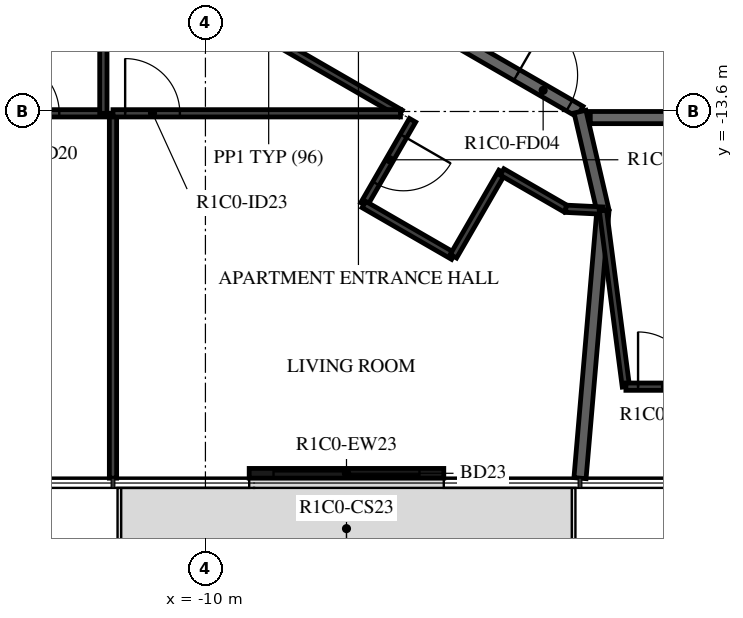
"""IFC4 building model, lengths in metres.
Left out: names, types, materials, properties, quantities, classifications, styles, units other than length and angle.
Written with IfcOpenShell. Run it as: python <this file> out.ifc"""

import sys

from ifc_helpers import new_model, si_unit, direction, frame, frame_2d, origin, place, context, subcontext, project, spatial, rectangle, extrude, element, fill, save


model = new_model("IFC4")
c1 = context("Model", 3, precision=1e-05, world=origin(), true_north=direction((0.0, 1.0)))
c2 = subcontext(c1, "Body", "Model", "MODEL_VIEW")
j1 = project(units=[si_unit("LENGTHUNIT", "METRE"), si_unit("PLANEANGLEUNIT", "RADIAN")], contexts=[c1])
p1 = place(None, origin())
s1 = spatial("IfcSite", under=j1, at=p1, CompositionType="ELEMENT")
p2 = place(p1, origin())
s2 = spatial("IfcBuilding", under=s1, at=p2, CompositionType="ELEMENT")
p3 = place(p2, frame((0.0, 0.0, 66.4)))
s3 = spatial("IfcBuildingStorey", under=s2, at=p3, CompositionType="ELEMENT", Elevation=66.4)
p4 = place(p3, frame((-9.28, -19.55, 0.0), z_axis=(0.0, 0.0, 1.0), x_axis=(1.0, 0.0, 0.0)))
e1 = element("IfcWall", 1, at=p4, inside=s3, PredefinedType="STANDARD", context=c2, shape_type="SweptSolid", body=[
    extrude(rectangle(XDim=3.2, YDim=0.16, at=frame_2d((1.6, 0.0))), origin(), (0.0, 0.0, 1.0), 3.05),
])
p5 = place(p4, frame((0.4, 0.0, 0.0)))
e2 = element("IfcOpeningElement", 2, at=p5, cuts=e1, PredefinedType="OPENING", context=c2, shape_type="SweptSolid", body=[
    extrude(rectangle(XDim=2.4, YDim=2.4, at=frame_2d((1.2, 1.2))), frame((0.0, 0.09, 0.0), z_axis=(0.0, -1.0, 0.0), x_axis=(1.0, 0.0, 0.0)), (0.0, 0.0, 1.0), 0.18),
])
p6 = place(p3, frame((-10.029, -10.029, 0.0), z_axis=(0.0, 0.0, 1.0), x_axis=(0.866022878987, -0.500004373052, 0.0)))
e3 = element("IfcWall", 3, at=p6, inside=s3, PredefinedType="STANDARD", context=c2, shape_type="SweptSolid", body=[
    extrude(rectangle(XDim=7.146, YDim=0.2, at=frame_2d((3.573, 0.0))), origin(), (0.0, 0.0, 1.0), 3.05),
])
p7 = place(p6, frame((5.947, 0.0, 0.0)))
e4 = element("IfcOpeningElement", 4, at=p7, cuts=e3, PredefinedType="OPENING", context=c2, shape_type="SweptSolid", body=[
    extrude(rectangle(XDim=1.0, YDim=2.1, at=frame_2d((0.5, 1.05))), frame((0.0, 0.11, 0.0), z_axis=(0.0, -1.0, 0.0), x_axis=(1.0, 0.0, 0.0)), (0.0, 0.0, 1.0), 0.22),
])
p8 = place(p3, frame((-3.671, -13.7, 0.0), z_axis=(0.0, 0.0, 1.0), x_axis=(1.0, 0.0, 0.0)))
e5 = element("IfcWall", 5, at=p8, inside=s3, PredefinedType="STANDARD", context=c2, shape_type="SweptSolid", body=[
    extrude(rectangle(XDim=7.342, YDim=0.2, at=frame_2d((3.671, 0.0))), origin(), (0.0, 0.0, 1.0), 3.05),
])
p9 = place(p8, frame((2.1, 0.0, 0.0)))
e6 = element("IfcOpeningElement", 6, at=p9, cuts=e5, PredefinedType="OPENING", context=c2, shape_type="SweptSolid", body=[
    extrude(rectangle(XDim=1.0, YDim=2.1, at=frame_2d((0.5, 1.05))), frame((0.0, 0.11, 0.0), z_axis=(0.0, -1.0, 0.0), x_axis=(1.0, 0.0, 0.0)), (0.0, 0.0, 1.0), 0.22),
])
p10 = place(p3, frame((-3.463, -15.23, 0.0), z_axis=(0.0, 0.0, 1.0), x_axis=(-0.225894501138, 0.974151771725, 0.0)))
e7 = element("IfcWall", 7, at=p10, inside=s3, PredefinedType="STANDARD", context=c2, shape_type="SweptSolid", body=[
    extrude(rectangle(XDim=1.671, YDim=0.2, at=frame_2d((0.835, 0.0))), origin(), (0.0, 0.0, 1.0), 3.05),
])
p11 = place(p3, frame((-3.84, -19.63, 0.0), z_axis=(0.0, 0.0, 1.0), x_axis=(0.085470135005, 0.996340732893, 0.0)))
e8 = element("IfcWall", 8, at=p11, inside=s3, PredefinedType="STANDARD", context=c2, shape_type="SweptSolid", body=[
    extrude(rectangle(XDim=4.416, YDim=0.2, at=frame_2d((2.208, 0.0))), origin(), (0.0, 0.0, 1.0), 3.05),
])
p12 = place(p3, frame((-11.127, -11.127, 0.0), z_axis=(0.0, 0.0, 1.0), x_axis=(0.866034514313, -0.499984219769, 0.0)))
e9 = element("IfcWall", 9, at=p12, inside=s3, PredefinedType="PARTITIONING", context=c2, shape_type="SweptSolid", body=[
    extrude(rectangle(XDim=5.006, YDim=0.12, at=frame_2d((2.503, 0.0))), origin(), (0.0, 0.0, 1.0), 3.05),
])
p13 = place(p12, frame((0.2, 0.0, 0.0)))
e10 = element("IfcOpeningElement", 10, at=p13, cuts=e9, PredefinedType="OPENING", context=c2, shape_type="SweptSolid", body=[
    extrude(rectangle(XDim=0.9, YDim=2.1, at=frame_2d((0.45, 1.05))), frame((0.0, 0.07, 0.0), z_axis=(0.0, -1.0, 0.0), x_axis=(1.0, 0.0, 0.0)), (0.0, 0.0, 1.0), 0.14),
])
p14 = place(p3, frame((-6.594, -13.744, 0.0), z_axis=(0.0, 0.0, 1.0), x_axis=(-0.499947031044, -0.866055983265, 0.0)))
e11 = element("IfcWall", 11, at=p14, inside=s3, PredefinedType="PARTITIONING", context=c2, shape_type="SweptSolid", body=[
    extrude(rectangle(XDim=1.6, YDim=0.12, at=frame_2d((0.8, 0.0))), origin(), (0.0, 0.0, 1.0), 3.05),
])
p15 = place(p14, frame((0.3, 0.0, 0.0)))
e12 = element("IfcOpeningElement", 12, at=p15, cuts=e11, PredefinedType="OPENING", context=c2, shape_type="SweptSolid", body=[
    extrude(rectangle(XDim=0.9, YDim=2.1, at=frame_2d((0.45, 1.05))), frame((0.0, 0.07, 0.0), z_axis=(0.0, -1.0, 0.0), x_axis=(1.0, 0.0, 0.0)), (0.0, 0.0, 1.0), 0.14),
])
p16 = place(p3, frame((-7.394, -15.13, 0.0), z_axis=(0.0, 0.0, 1.0), x_axis=(0.86605165483, -0.499954529098, 0.0)))
e13 = element("IfcWall", 13, at=p16, inside=s3, PredefinedType="PARTITIONING", context=c2, shape_type="SweptSolid", body=[
    extrude(rectangle(XDim=1.7, YDim=0.12, at=frame_2d((0.85, 0.0))), origin(), (0.0, 0.0, 1.0), 3.05),
])
p17 = place(p3, frame((-5.922, -15.98, 0.0), z_axis=(0.0, 0.0, 1.0), x_axis=(0.500013115284, 0.866017831539, 0.0)))
e14 = element("IfcWall", 14, at=p17, inside=s3, PredefinedType="PARTITIONING", context=c2, shape_type="SweptSolid", body=[
    extrude(rectangle(XDim=1.6, YDim=0.12, at=frame_2d((0.8, 0.0))), origin(), (0.0, 0.0, 1.0), 3.05),
])
p18 = place(p3, frame((-5.122, -14.594, 0.0), z_axis=(0.0, 0.0, 1.0), x_axis=(0.86610168388, -0.499867855718, 0.0)))
e15 = element("IfcWall", 15, at=p18, inside=s3, PredefinedType="PARTITIONING", context=c2, shape_type="SweptSolid", body=[
    extrude(rectangle(XDim=1.211, YDim=0.12, at=frame_2d((0.605, 0.0))), origin(), (0.0, 0.0, 1.0), 3.05),
])
p19 = place(p3, frame((-4.073, -15.2, 0.0), z_axis=(0.0, 0.0, 1.0), x_axis=(0.99879090756, -0.049160176723, 0.0)))
e16 = element("IfcWall", 16, at=p19, inside=s3, PredefinedType="PARTITIONING", context=c2, shape_type="SweptSolid", body=[
    extrude(rectangle(XDim=0.611, YDim=0.12, at=frame_2d((0.305, 0.0))), origin(), (0.0, 0.0, 1.0), 3.05),
])
p20 = place(p3, frame((-19.794, -13.63, 0.0), z_axis=(0.0, 0.0, 1.0), x_axis=(1.0, 0.0, 0.0)))
e17 = element("IfcWall", 17, at=p20, inside=s3, PredefinedType="PARTITIONING", context=c2, shape_type="SweptSolid", body=[
    extrude(rectangle(XDim=8.156, YDim=0.12, at=frame_2d((4.078, 0.0))), origin(), (0.0, 0.0, 1.0), 3.05),
])
p21 = place(p20, frame((6.491, 0.0, 0.0)))
e18 = element("IfcOpeningElement", 18, at=p21, cuts=e17, PredefinedType="OPENING", context=c2, shape_type="SweptSolid", body=[
    extrude(rectangle(XDim=0.9, YDim=2.1, at=frame_2d((0.45, 1.05))), frame((0.0, 0.07, 0.0), z_axis=(0.0, -1.0, 0.0), x_axis=(1.0, 0.0, 0.0)), (0.0, 0.0, 1.0), 0.14),
])
p22 = place(p3, frame((-11.678, -13.63, 0.0), z_axis=(0.0, 0.0, 1.0), x_axis=(0.0, 1.0, 0.0)))
e19 = element("IfcWall", 19, at=p22, inside=s3, PredefinedType="PARTITIONING", context=c2, shape_type="SweptSolid", body=[
    extrude(rectangle(XDim=3.458, YDim=0.12, at=frame_2d((1.729, 0.0))), origin(), (0.0, 0.0, 1.0), 3.05),
])
p23 = place(p3, frame((-11.52, -19.63, 0.0), z_axis=(0.0, 0.0, 1.0), x_axis=(0.0, 1.0, 0.0)))
e20 = element("IfcWall", 20, at=p23, inside=s3, PredefinedType="PARTITIONING", context=c2, shape_type="SweptSolid", body=[
    extrude(rectangle(XDim=6.0, YDim=0.12, at=frame_2d((3.0, 0.0))), origin(), (0.0, 0.0, 1.0), 3.05),
])
p24 = place(p3, frame((-11.52, -13.63, 0.0), z_axis=(0.0, 0.0, 1.0), x_axis=(1.0, 0.0, 0.0)))
e21 = element("IfcWall", 21, at=p24, inside=s3, PredefinedType="PARTITIONING", context=c2, shape_type="SweptSolid", body=[
    extrude(rectangle(XDim=4.728, YDim=0.12, at=frame_2d((2.364, 0.0))), origin(), (0.0, 0.0, 1.0), 3.05),
])
p25 = place(p24, frame((0.2, 0.0, 0.0)))
e22 = element("IfcOpeningElement", 22, at=p25, cuts=e21, PredefinedType="OPENING", context=c2, shape_type="SweptSolid", body=[
    extrude(rectangle(XDim=0.9, YDim=2.1, at=frame_2d((0.45, 1.05))), frame((0.0, 0.07, 0.0), z_axis=(0.0, -1.0, 0.0), x_axis=(1.0, 0.0, 0.0)), (0.0, 0.0, 1.0), 0.14),
])
p26 = place(p3, frame((-3.463, -15.23, 0.0), z_axis=(0.0, 0.0, 1.0), x_axis=(0.129260547059, -0.991610665016, 0.0)))
e23 = element("IfcWall", 23, at=p26, inside=s3, PredefinedType="PARTITIONING", context=c2, shape_type="SweptSolid", body=[
    extrude(rectangle(XDim=2.92, YDim=0.12, at=frame_2d((1.46, 0.0))), origin(), (0.0, 0.0, 1.0), 3.05),
])
p27 = place(p3, frame((-3.085, -18.125, 0.0), z_axis=(0.0, 0.0, 1.0), x_axis=(1.0, 0.0, 0.0)))
e24 = element("IfcWall", 24, at=p27, inside=s3, PredefinedType="PARTITIONING", context=c2, shape_type="SweptSolid", body=[
    extrude(rectangle(XDim=3.3, YDim=0.12, at=frame_2d((1.65, 0.0))), origin(), (0.0, 0.0, 1.0), 3.05),
])
p28 = place(p27, frame((0.2, 0.0, 0.0)))
e25 = element("IfcOpeningElement", 25, at=p28, cuts=e24, PredefinedType="OPENING", context=c2, shape_type="SweptSolid", body=[
    extrude(rectangle(XDim=0.9, YDim=2.1, at=frame_2d((0.45, 1.05))), frame((0.0, 0.07, 0.0), z_axis=(0.0, -1.0, 0.0), x_axis=(1.0, 0.0, 0.0)), (0.0, 0.0, 1.0), 0.14),
])
p29 = place(p5, origin())
e26 = element("IfcDoor", 26, at=p29, inside=s3, OperationType="DOUBLE_DOOR_SLIDING", PredefinedType="DOOR", context=c2, shape_type="SweptSolid", body=[
    extrude(rectangle(XDim=2.4, YDim=2.4, at=frame_2d((1.2, 1.2))), frame((0.0, 0.025, 0.0), z_axis=(0.0, -1.0, 0.0), x_axis=(1.0, 0.0, 0.0)), (0.0, 0.0, 1.0), 0.05),
])
fill(e2, e26)
p30 = place(p7, origin())
e27 = element("IfcDoor", 27, at=p30, inside=s3, OperationType="SINGLE_SWING_LEFT", PredefinedType="DOOR", context=c2, shape_type="SweptSolid", body=[
    extrude(rectangle(XDim=1.0, YDim=2.1, at=frame_2d((0.5, 1.05))), frame((0.0, 0.025, 0.0), z_axis=(0.0, -1.0, 0.0), x_axis=(1.0, 0.0, 0.0)), (0.0, 0.0, 1.0), 0.05),
])
fill(e4, e27)
p31 = place(p15, origin())
e28 = element("IfcDoor", 28, at=p31, inside=s3, OperationType="SINGLE_SWING_RIGHT", PredefinedType="DOOR", context=c2, shape_type="SweptSolid", body=[
    extrude(rectangle(XDim=0.9, YDim=2.1, at=frame_2d((0.45, 1.05))), frame((0.0, 0.025, 0.0), z_axis=(0.0, -1.0, 0.0), x_axis=(1.0, 0.0, 0.0)), (0.0, 0.0, 1.0), 0.05),
])
fill(e12, e28)
p32 = place(p21, origin())
e29 = element("IfcDoor", 29, at=p32, inside=s3, OperationType="SINGLE_SWING_LEFT", PredefinedType="DOOR", context=c2, shape_type="SweptSolid", body=[
    extrude(rectangle(XDim=0.9, YDim=2.1, at=frame_2d((0.45, 1.05))), frame((0.0, 0.025, 0.0), z_axis=(0.0, -1.0, 0.0), x_axis=(1.0, 0.0, 0.0)), (0.0, 0.0, 1.0), 0.05),
])
fill(e18, e29)
p33 = place(p25, origin())
e30 = element("IfcDoor", 30, at=p33, inside=s3, OperationType="SINGLE_SWING_RIGHT", PredefinedType="DOOR", context=c2, shape_type="SweptSolid", body=[
    extrude(rectangle(XDim=0.9, YDim=2.1, at=frame_2d((0.45, 1.05))), frame((0.0, 0.025, 0.0), z_axis=(0.0, -1.0, 0.0), x_axis=(1.0, 0.0, 0.0)), (0.0, 0.0, 1.0), 0.05),
])
fill(e22, e30)
p34 = place(p28, origin())
e31 = element("IfcDoor", 31, at=p34, inside=s3, OperationType="SINGLE_SWING_LEFT", PredefinedType="DOOR", context=c2, shape_type="SweptSolid", body=[
    extrude(rectangle(XDim=0.9, YDim=2.1, at=frame_2d((0.45, 1.05))), frame((0.0, 0.025, 0.0), z_axis=(0.0, -1.0, 0.0), x_axis=(1.0, 0.0, 0.0)), (0.0, 0.0, 1.0), 0.05),
])
fill(e25, e31)
save(model, sys.argv[1])
